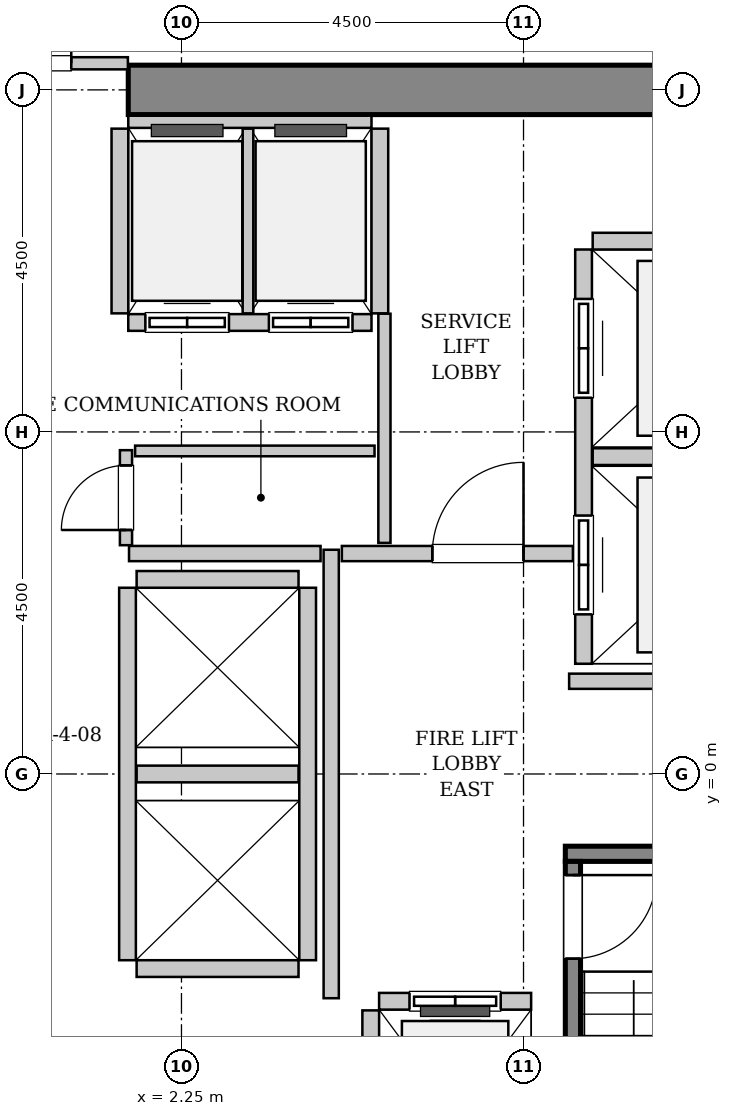
"""IFC4 building model, lengths in metres.
Left out: names, types, materials, properties, quantities, classifications, styles, units other than length and angle.
Written with IfcOpenShell. Run it as: python <this file> out.ifc"""

import sys

from ifc_helpers import new_model, si_unit, direction, frame, frame_2d, origin, place, context, subcontext, project, spatial, rectangle, extrude, source, transform, mapped, element, fill, save


model = new_model("IFC4")
c1 = context("Model", 3, precision=1e-05, world=origin(), true_north=direction((0.0, 1.0)))
c2 = subcontext(c1, "Body", "Model", "MODEL_VIEW")
j1 = project(units=[si_unit("LENGTHUNIT", "METRE"), si_unit("PLANEANGLEUNIT", "RADIAN")], contexts=[c1])
p1 = place(None, origin())
s1 = spatial("IfcSite", under=j1, at=p1, CompositionType="ELEMENT")
p2 = place(p1, origin())
s2 = spatial("IfcBuilding", under=s1, at=p2, CompositionType="ELEMENT")
p3 = place(p2, frame((0.0, 0.0, 86.2)))
s3 = spatial("IfcBuildingStorey", under=s2, at=p3, CompositionType="ELEMENT", Elevation=86.2)
m1 = source(origin(), c2, "Body", "SweptSolid", [
    extrude(rectangle(XDim=10.025, YDim=0.65, at=frame_2d((5.012, 0.0))), origin(), (0.0, 0.0, 1.0), 4.6),
])
p4 = place(p3, frame((1.55, 9.0, 0.0), z_axis=(0.0, 0.0, 1.0), x_axis=(1.0, 0.0, 0.0)))
e1 = element("IfcWall", 1, at=p4, inside=s3, PredefinedType="SHEAR", context=c2, shape_type="MappedRepresentation", body=[
    mapped(m1, transform((0.0, 0.0, 0.0), x_axis=(1.0, 0.0, 0.0), y_axis=(0.0, 1.0, 0.0), z_axis=(0.0, 0.0, 1.0), scale=1.0)),
])
m2 = source(origin(), c2, "Body", "SweptSolid", [
    extrude(rectangle(XDim=3.4, YDim=0.2, at=frame_2d((1.7, 0.0))), origin(), (0.0, 0.0, 1.0), 4.6),
])
p5 = place(p3, frame((7.3, -1.05, 0.0), z_axis=(0.0, 0.0, 1.0), x_axis=(1.0, 0.0, 0.0)))
e2 = element("IfcWall", 2, at=p5, inside=s3, PredefinedType="SOLIDWALL", context=c2, shape_type="MappedRepresentation", body=[
    mapped(m2, transform((0.0, 0.0, 0.0), x_axis=(1.0, 0.0, 0.0), y_axis=(0.0, 1.0, 0.0), z_axis=(0.0, 0.0, 1.0), scale=1.0)),
])
m3 = source(origin(), c2, "Body", "SweptSolid", [
    extrude(rectangle(XDim=7.1, YDim=0.2, at=frame_2d((3.55, 0.0))), origin(), (0.0, 0.0, 1.0), 4.6),
])
p6 = place(p3, frame((7.4, -1.15, 0.0), z_axis=(0.0, 0.0, 1.0), x_axis=(0.0, -1.0, 0.0)))
e3 = element("IfcWall", 3, at=p6, inside=s3, PredefinedType="SOLIDWALL", context=c2, shape_type="MappedRepresentation", body=[
    mapped(m3, transform((0.0, 0.0, 0.0), x_axis=(1.0, 0.0, 0.0), y_axis=(0.0, 1.0, 0.0), z_axis=(0.0, 0.0, 1.0), scale=1.0)),
])
p7 = place(p6, frame((0.18, 0.0, 0.0)))
e4 = element("IfcOpeningElement", 4, at=p7, cuts=e3, PredefinedType="OPENING", context=c2, shape_type="SweptSolid", body=[
    extrude(rectangle(XDim=1.1, YDim=2.15, at=frame_2d((0.55, 1.075))), frame((0.0, 0.11, 0.0), z_axis=(0.0, -1.0, 0.0), x_axis=(1.0, 0.0, 0.0)), (0.0, 0.0, 1.0), 0.22),
])
m4 = source(origin(), c2, "Body", "SweptSolid", [
    extrude(rectangle(XDim=2.0, YDim=0.22, at=frame_2d((1.0, 0.0))), origin(), (0.0, 0.0, 1.0), 4.335),
])
p8 = place(p3, frame((6.85, -2.99, 0.0), z_axis=(0.0, 0.0, 1.0), x_axis=(-1.0, 0.0, 0.0)))
e5 = element("IfcWall", 5, at=p8, inside=s3, PredefinedType="SOLIDWALL", context=c2, shape_type="MappedRepresentation", body=[
    mapped(m4, transform((0.0, 0.0, 0.0), x_axis=(1.0, 0.0, 0.0), y_axis=(0.0, 1.0, 0.0), z_axis=(0.0, 0.0, 1.0), scale=1.0)),
])
p9 = place(p8, frame((0.4, 0.0, 0.0)))
e6 = element("IfcOpeningElement", 6, at=p9, cuts=e5, PredefinedType="OPENING", context=c2, shape_type="SweptSolid", body=[
    extrude(rectangle(XDim=1.2, YDim=2.2, at=frame_2d((0.6, 1.1))), frame((0.0, 0.12, 0.0), z_axis=(0.0, -1.0, 0.0), x_axis=(1.0, 0.0, 0.0)), (0.0, 0.0, 1.0), 0.24),
])
m5 = source(origin(), c2, "Body", "SweptSolid", [
    extrude(rectangle(XDim=2.68, YDim=0.22, at=frame_2d((1.34, 0.0))), origin(), (0.0, 0.0, 1.0), 4.335),
])
p10 = place(p3, frame((4.74, -3.11, 0.0), z_axis=(0.0, 0.0, 1.0), x_axis=(0.0, -1.0, 0.0)))
e7 = element("IfcWall", 7, at=p10, inside=s3, PredefinedType="SOLIDWALL", context=c2, shape_type="MappedRepresentation", body=[
    mapped(m5, transform((0.0, 0.0, 0.0), x_axis=(1.0, 0.0, 0.0), y_axis=(0.0, 1.0, 0.0), z_axis=(0.0, 0.0, 1.0), scale=1.0)),
])
m6 = source(origin(), c2, "Body", "SweptSolid", [
    extrude(rectangle(XDim=5.45, YDim=0.22, at=frame_2d((2.725, 0.0))), origin(), (0.0, 0.0, 1.0), 4.335),
])
p11 = place(p3, frame((7.54, 6.9, 0.0), z_axis=(0.0, 0.0, 1.0), x_axis=(0.0, -1.0, 0.0)))
e8 = element("IfcWall", 8, at=p11, inside=s3, PredefinedType="SOLIDWALL", context=c2, shape_type="MappedRepresentation", body=[
    mapped(m6, transform((0.0, 0.0, 0.0), x_axis=(1.0, 0.0, 0.0), y_axis=(0.0, 1.0, 0.0), z_axis=(0.0, 0.0, 1.0), scale=1.0)),
])
p12 = place(p11, frame((3.5, 0.0, 0.0)))
e9 = element("IfcOpeningElement", 9, at=p12, cuts=e8, PredefinedType="OPENING", context=c2, shape_type="SweptSolid", body=[
    extrude(rectangle(XDim=1.3, YDim=2.3, at=frame_2d((0.65, 1.15))), frame((0.0, 0.12, 0.0), z_axis=(0.0, -1.0, 0.0), x_axis=(1.0, 0.0, 0.0)), (0.0, 0.0, 1.0), 0.24),
])
p13 = place(p11, frame((0.65, 0.0, 0.0)))
e10 = element("IfcOpeningElement", 10, at=p13, cuts=e8, PredefinedType="OPENING", context=c2, shape_type="SweptSolid", body=[
    extrude(rectangle(XDim=1.3, YDim=2.3, at=frame_2d((0.65, 1.15))), frame((0.0, 0.12, 0.0), z_axis=(0.0, -1.0, 0.0), x_axis=(1.0, 0.0, 0.0)), (0.0, 0.0, 1.0), 0.24),
])
m7 = source(origin(), c2, "Body", "SweptSolid", [
    extrude(rectangle(XDim=2.78, YDim=0.22, at=frame_2d((1.39, 0.0))), origin(), (0.0, 0.0, 1.0), 4.335),
])
for number, where, z_axis, x_axis in (
    (11, (7.66, 4.175, 0.0), (0.0, 0.0, 1.0), (1.0, 0.0, 0.0)),
    (12, (10.44, 7.01, 0.0), (0.0, 0.0, 1.0), (-1.0, 0.0, 0.0)),
):
    element("IfcWall", number, at=place(p3, frame(where, z_axis=z_axis, x_axis=x_axis)), inside=s3, PredefinedType="SOLIDWALL", context=c2, shape_type="MappedRepresentation", body=[
        mapped(m7, transform((0.0, 0.0, 0.0), x_axis=(1.0, 0.0, 0.0), y_axis=(0.0, 1.0, 0.0), z_axis=(0.0, 0.0, 1.0), scale=1.0)),
    ])
m8 = source(origin(), c2, "Body", "SweptSolid", [
    extrude(rectangle(XDim=3.2, YDim=0.22, at=frame_2d((1.6, 0.0))), origin(), (0.0, 0.0, 1.0), 4.335),
])
p14 = place(p3, frame((1.55, 5.94, 0.0), z_axis=(0.0, 0.0, 1.0), x_axis=(1.0, 0.0, 0.0)))
e13 = element("IfcWall", 13, at=p14, inside=s3, PredefinedType="SOLIDWALL", context=c2, shape_type="MappedRepresentation", body=[
    mapped(m8, transform((0.0, 0.0, 0.0), x_axis=(1.0, 0.0, 0.0), y_axis=(0.0, 1.0, 0.0), z_axis=(0.0, 0.0, 1.0), scale=1.0)),
])
p15 = place(p14, frame((0.225, 0.0, 0.0)))
e14 = element("IfcOpeningElement", 14, at=p15, cuts=e13, PredefinedType="OPENING", context=c2, shape_type="SweptSolid", body=[
    extrude(rectangle(XDim=1.1, YDim=2.2, at=frame_2d((0.55, 1.1))), frame((0.0, 0.12, 0.0), z_axis=(0.0, -1.0, 0.0), x_axis=(1.0, 0.0, 0.0)), (0.0, 0.0, 1.0), 0.24),
])
p16 = place(p14, frame((1.85, 0.0, 0.0)))
e15 = element("IfcOpeningElement", 15, at=p16, cuts=e13, PredefinedType="OPENING", context=c2, shape_type="SweptSolid", body=[
    extrude(rectangle(XDim=1.1, YDim=2.2, at=frame_2d((0.55, 1.1))), frame((0.0, 0.12, 0.0), z_axis=(0.0, -1.0, 0.0), x_axis=(1.0, 0.0, 0.0)), (0.0, 0.0, 1.0), 0.24),
])
m9 = source(origin(), c2, "Body", "SweptSolid", [
    extrude(rectangle(XDim=3.2, YDim=0.16, at=frame_2d((1.6, 0.0))), origin(), (0.0, 0.0, 1.0), 3.225),
])
p17 = place(p3, frame((4.75, 8.58, 0.0), z_axis=(0.0, 0.0, 1.0), x_axis=(-1.0, 0.0, 0.0)))
e16 = element("IfcWall", 16, at=p17, inside=s3, PredefinedType="PARTITIONING", context=c2, shape_type="MappedRepresentation", body=[
    mapped(m9, transform((0.0, 0.0, 0.0), x_axis=(1.0, 0.0, 0.0), y_axis=(0.0, 1.0, 0.0), z_axis=(0.0, 0.0, 1.0), scale=1.0)),
])
m10 = source(origin(), c2, "Body", "SweptSolid", [
    extrude(rectangle(XDim=2.43, YDim=0.22, at=frame_2d((1.215, 0.0))), origin(), (0.0, 0.0, 1.0), 4.335),
])
p18 = place(p3, frame((1.44, 8.49, 0.0), z_axis=(0.0, 0.0, 1.0), x_axis=(0.0, -1.0, 0.0)))
e17 = element("IfcWall", 17, at=p18, inside=s3, PredefinedType="SOLIDWALL", context=c2, shape_type="MappedRepresentation", body=[
    mapped(m10, transform((0.0, 0.0, 0.0), x_axis=(1.0, 0.0, 0.0), y_axis=(0.0, 1.0, 0.0), z_axis=(0.0, 0.0, 1.0), scale=1.0)),
])
m11 = source(origin(), c2, "Body", "SweptSolid", [
    extrude(rectangle(XDim=2.43, YDim=0.14, at=frame_2d((1.215, 0.0))), origin(), (0.0, 0.0, 1.0), 4.335),
])
p19 = place(p3, frame((3.125, 6.06, 0.0), z_axis=(0.0, 0.0, 1.0), x_axis=(0.0, 1.0, 0.0)))
e18 = element("IfcWall", 18, at=p19, inside=s3, PredefinedType="PARTITIONING", context=c2, shape_type="MappedRepresentation", body=[
    mapped(m11, transform((0.0, 0.0, 0.0), x_axis=(1.0, 0.0, 0.0), y_axis=(0.0, 1.0, 0.0), z_axis=(0.0, 0.0, 1.0), scale=1.0)),
])
p20 = place(p3, frame((4.86, 6.06, 0.0), z_axis=(0.0, 0.0, 1.0), x_axis=(0.0, 1.0, 0.0)))
e19 = element("IfcWall", 19, at=p20, inside=s3, PredefinedType="SOLIDWALL", context=c2, shape_type="MappedRepresentation", body=[
    mapped(m10, transform((0.0, 0.0, 0.0), x_axis=(1.0, 0.0, 0.0), y_axis=(0.0, 1.0, 0.0), z_axis=(0.0, 0.0, 1.0), scale=1.0)),
])
m12 = source(origin(), c2, "Body", "SweptSolid", [
    extrude(rectangle(XDim=4.9, YDim=0.22, at=frame_2d((2.45, 0.0))), origin(), (0.0, 0.0, 1.0), 4.335),
])
for number, where, z_axis, x_axis in (
    (20, (1.54, 2.45, 0.0), (0.0, 0.0, 1.0), (0.0, -1.0, 0.0)),
    (21, (3.91, -2.45, 0.0), (0.0, 0.0, 1.0), (0.0, 1.0, 0.0)),
):
    element("IfcWall", number, at=place(p3, frame(where, z_axis=z_axis, x_axis=x_axis)), inside=s3, PredefinedType="SOLIDWALL", context=c2, shape_type="MappedRepresentation", body=[
        mapped(m12, transform((0.0, 0.0, 0.0), x_axis=(1.0, 0.0, 0.0), y_axis=(0.0, 1.0, 0.0), z_axis=(0.0, 0.0, 1.0), scale=1.0)),
    ])
m13 = source(origin(), c2, "Body", "SweptSolid", [
    extrude(rectangle(XDim=2.13, YDim=0.22, at=frame_2d((1.065, 0.0))), origin(), (0.0, 0.0, 1.0), 4.335),
])
for number, where, z_axis, x_axis in (
    (22, (1.66, -2.56, 0.0), (0.0, 0.0, 1.0), (1.0, 0.0, 0.0)),
    (23, (1.66, 0.0, 0.0), (0.0, 0.0, 1.0), (1.0, 0.0, 0.0)),
    (24, (3.79, 2.56, 0.0), (0.0, 0.0, 1.0), (-1.0, 0.0, 0.0)),
):
    element("IfcWall", number, at=place(p3, frame(where, z_axis=z_axis, x_axis=x_axis)), inside=s3, PredefinedType="SOLIDWALL", context=c2, shape_type="MappedRepresentation", body=[
        mapped(m13, transform((0.0, 0.0, 0.0), x_axis=(1.0, 0.0, 0.0), y_axis=(0.0, 1.0, 0.0), z_axis=(0.0, 0.0, 1.0), scale=1.0)),
    ])
m14 = source(origin(), c2, "Body", "SweptSolid", [
    extrude(rectangle(XDim=5.9, YDim=0.2, at=frame_2d((2.95, 0.0))), origin(), (0.0, 0.0, 1.0), 4.335),
])
p21 = place(p3, frame((4.22, -2.95, 0.0), z_axis=(0.0, 0.0, 1.0), x_axis=(0.0, 1.0, 0.0)))
e25 = element("IfcWall", 25, at=p21, inside=s3, PredefinedType="PARTITIONING", context=c2, shape_type="MappedRepresentation", body=[
    mapped(m14, transform((0.0, 0.0, 0.0), x_axis=(1.0, 0.0, 0.0), y_axis=(0.0, 1.0, 0.0), z_axis=(0.0, 0.0, 1.0), scale=1.0)),
])
m15 = source(origin(), c2, "Body", "SweptSolid", [
    extrude(rectangle(XDim=2.52, YDim=0.2, at=frame_2d((1.26, 0.0))), origin(), (0.0, 0.0, 1.0), 4.335),
])
p22 = place(p3, frame((1.56, 2.9, 0.0), z_axis=(0.0, 0.0, 1.0), x_axis=(1.0, 0.0, 0.0)))
e26 = element("IfcWall", 26, at=p22, inside=s3, PredefinedType="PARTITIONING", context=c2, shape_type="MappedRepresentation", body=[
    mapped(m15, transform((0.0, 0.0, 0.0), x_axis=(1.0, 0.0, 0.0), y_axis=(0.0, 1.0, 0.0), z_axis=(0.0, 0.0, 1.0), scale=1.0)),
])
m16 = source(origin(), c2, "Body", "SweptSolid", [
    extrude(rectangle(XDim=3.04, YDim=0.2, at=frame_2d((1.52, 0.0))), origin(), (0.0, 0.0, 1.0), 4.335),
])
p23 = place(p3, frame((4.36, 2.9, 0.0), z_axis=(0.0, 0.0, 1.0), x_axis=(1.0, 0.0, 0.0)))
e27 = element("IfcWall", 27, at=p23, inside=s3, PredefinedType="PARTITIONING", context=c2, shape_type="MappedRepresentation", body=[
    mapped(m16, transform((0.0, 0.0, 0.0), x_axis=(1.0, 0.0, 0.0), y_axis=(0.0, 1.0, 0.0), z_axis=(0.0, 0.0, 1.0), scale=1.0)),
])
p24 = place(p23, frame((1.19, 0.0, 0.0)))
e28 = element("IfcOpeningElement", 28, at=p24, cuts=e27, PredefinedType="OPENING", context=c2, shape_type="SweptSolid", body=[
    extrude(rectangle(XDim=1.2, YDim=2.15, at=frame_2d((0.6, 1.075))), frame((0.0, 0.11, 0.0), z_axis=(0.0, -1.0, 0.0), x_axis=(1.0, 0.0, 0.0)), (0.0, 0.0, 1.0), 0.22),
])
m17 = source(origin(), c2, "Body", "SweptSolid", [
    extrude(rectangle(XDim=4.11, YDim=0.2, at=frame_2d((2.055, 0.0))), origin(), (0.0, 0.0, 1.0), 4.335),
])
p25 = place(p3, frame((7.35, 1.22, 0.0), z_axis=(0.0, 0.0, 1.0), x_axis=(1.0, 0.0, 0.0)))
e29 = element("IfcWall", 29, at=p25, inside=s3, PredefinedType="PARTITIONING", context=c2, shape_type="MappedRepresentation", body=[
    mapped(m17, transform((0.0, 0.0, 0.0), x_axis=(1.0, 0.0, 0.0), y_axis=(0.0, 1.0, 0.0), z_axis=(0.0, 0.0, 1.0), scale=1.0)),
])
m18 = source(origin(), c2, "Body", "SweptSolid", [
    extrude(rectangle(XDim=3.09, YDim=0.16, at=frame_2d((1.545, 0.0))), origin(), (0.0, 0.0, 1.0), 3.225),
])
p26 = place(p3, frame((-1.545, 9.35, 0.0), z_axis=(0.0, 0.0, 1.0), x_axis=(1.0, 0.0, 0.0)))
e30 = element("IfcWall", 30, at=p26, inside=s3, PredefinedType="PARTITIONING", context=c2, shape_type="MappedRepresentation", body=[
    mapped(m18, transform((0.0, 0.0, 0.0), x_axis=(1.0, 0.0, 0.0), y_axis=(0.0, 1.0, 0.0), z_axis=(0.0, 0.0, 1.0), scale=1.0)),
])
p27 = place(p26, frame((0.745, 0.0, 0.0)))
e31 = element("IfcOpeningElement", 31, at=p27, cuts=e30, PredefinedType="OPENING", context=c2, shape_type="SweptSolid", body=[
    extrude(rectangle(XDim=1.6, YDim=2.3, at=frame_2d((0.8, 1.15))), frame((0.0, 0.09, 0.0), z_axis=(0.0, -1.0, 0.0), x_axis=(1.0, 0.0, 0.0)), (0.0, 0.0, 1.0), 0.18),
])
m19 = source(origin(), c2, "Body", "SweptSolid", [
    extrude(rectangle(XDim=3.015, YDim=0.16, at=frame_2d((1.507, 0.0))), origin(), (0.0, 0.0, 1.0), 4.335),
])
p28 = place(p3, frame((4.92, 3.04, 0.0), z_axis=(0.0, 0.0, 1.0), x_axis=(0.0, 1.0, 0.0)))
e32 = element("IfcWall", 32, at=p28, inside=s3, PredefinedType="PARTITIONING", context=c2, shape_type="MappedRepresentation", body=[
    mapped(m19, transform((0.0, 0.0, 0.0), x_axis=(1.0, 0.0, 0.0), y_axis=(0.0, 1.0, 0.0), z_axis=(0.0, 0.0, 1.0), scale=1.0)),
])
m20 = source(origin(), c2, "Body", "SweptSolid", [
    extrude(rectangle(XDim=1.25, YDim=0.16, at=frame_2d((0.625, 0.0))), origin(), (0.0, 0.0, 1.0), 4.335),
])
p29 = place(p3, frame((1.52, 3.01, 0.0), z_axis=(0.0, 0.0, 1.0), x_axis=(0.0, 1.0, 0.0)))
e33 = element("IfcWall", 33, at=p29, inside=s3, PredefinedType="PARTITIONING", context=c2, shape_type="MappedRepresentation", body=[
    mapped(m20, transform((0.0, 0.0, 0.0), x_axis=(1.0, 0.0, 0.0), y_axis=(0.0, 1.0, 0.0), z_axis=(0.0, 0.0, 1.0), scale=1.0)),
])
p30 = place(p29, frame((0.2, 0.0, 0.0)))
e34 = element("IfcOpeningElement", 34, at=p30, cuts=e33, PredefinedType="OPENING", context=c2, shape_type="SweptSolid", body=[
    extrude(rectangle(XDim=0.85, YDim=2.1, at=frame_2d((0.425, 1.05))), frame((0.0, 0.09, 0.0), z_axis=(0.0, -1.0, 0.0), x_axis=(1.0, 0.0, 0.0)), (0.0, 0.0, 1.0), 0.18),
])
m21 = source(origin(), c2, "Body", "SweptSolid", [
    extrude(rectangle(XDim=3.15, YDim=0.14, at=frame_2d((1.575, 0.0))), origin(), (0.0, 0.0, 1.0), 4.335),
])
p31 = place(p3, frame((1.64, 4.25, 0.0), z_axis=(0.0, 0.0, 1.0), x_axis=(1.0, 0.0, 0.0)))
e35 = element("IfcWall", 35, at=p31, inside=s3, PredefinedType="PARTITIONING", context=c2, shape_type="MappedRepresentation", body=[
    mapped(m21, transform((0.0, 0.0, 0.0), x_axis=(1.0, 0.0, 0.0), y_axis=(0.0, 1.0, 0.0), z_axis=(0.0, 0.0, 1.0), scale=1.0)),
])
m22 = source(origin(), c2, "Body", "SweptSolid", [
    extrude(rectangle(XDim=1.1, YDim=2.15, at=frame_2d((0.55, 1.075))), frame((0.0, 0.025, 0.0), z_axis=(0.0, -1.0, 0.0), x_axis=(1.0, 0.0, 0.0)), (0.0, 0.0, 1.0), 0.05),
])
p32 = place(p7, origin())
e36 = element("IfcDoor", 36, at=p32, inside=s3, OperationType="SINGLE_SWING_LEFT", PredefinedType="DOOR", context=c2, shape_type="MappedRepresentation", body=[
    mapped(m22, transform((0.0, 0.0, 0.0), x_axis=(1.0, 0.0, 0.0), y_axis=(0.0, 1.0, 0.0), z_axis=(0.0, 0.0, 1.0), scale=1.0)),
])
fill(e4, e36)
m23 = source(origin(), c2, "Body", "SweptSolid", [
    extrude(rectangle(XDim=1.2, YDim=2.2, at=frame_2d((0.6, 1.1))), frame((0.0, 0.025, 0.0), z_axis=(0.0, -1.0, 0.0), x_axis=(1.0, 0.0, 0.0)), (0.0, 0.0, 1.0), 0.05),
])
p33 = place(p9, origin())
e37 = element("IfcDoor", 37, at=p33, inside=s3, OperationType="SLIDING_TO_LEFT", PredefinedType="DOOR", context=c2, shape_type="MappedRepresentation", body=[
    mapped(m23, transform((0.0, 0.0, 0.0), x_axis=(1.0, 0.0, 0.0), y_axis=(0.0, 1.0, 0.0), z_axis=(0.0, 0.0, 1.0), scale=1.0)),
])
fill(e6, e37)
m24 = source(origin(), c2, "Body", "SweptSolid", [
    extrude(rectangle(XDim=1.3, YDim=2.3, at=frame_2d((0.65, 1.15))), frame((0.0, 0.025, 0.0), z_axis=(0.0, -1.0, 0.0), x_axis=(1.0, 0.0, 0.0)), (0.0, 0.0, 1.0), 0.05),
])
p34 = place(p12, origin())
e38 = element("IfcDoor", 38, at=p34, inside=s3, OperationType="SLIDING_TO_RIGHT", PredefinedType="DOOR", context=c2, shape_type="MappedRepresentation", body=[
    mapped(m24, transform((0.0, 0.0, 0.0), x_axis=(1.0, 0.0, 0.0), y_axis=(0.0, 1.0, 0.0), z_axis=(0.0, 0.0, 1.0), scale=1.0)),
])
fill(e9, e38)
p35 = place(p13, origin())
e39 = element("IfcDoor", 39, at=p35, inside=s3, OperationType="SLIDING_TO_RIGHT", PredefinedType="DOOR", context=c2, shape_type="MappedRepresentation", body=[
    mapped(m24, transform((0.0, 0.0, 0.0), x_axis=(1.0, 0.0, 0.0), y_axis=(0.0, 1.0, 0.0), z_axis=(0.0, 0.0, 1.0), scale=1.0)),
])
fill(e10, e39)
m25 = source(origin(), c2, "Body", "SweptSolid", [
    extrude(rectangle(XDim=1.1, YDim=2.2, at=frame_2d((0.55, 1.1))), frame((0.0, 0.025, 0.0), z_axis=(0.0, -1.0, 0.0), x_axis=(1.0, 0.0, 0.0)), (0.0, 0.0, 1.0), 0.05),
])
p36 = place(p15, origin())
e40 = element("IfcDoor", 40, at=p36, inside=s3, OperationType="DOUBLE_DOOR_SLIDING", PredefinedType="DOOR", context=c2, shape_type="MappedRepresentation", body=[
    mapped(m25, transform((0.0, 0.0, 0.0), x_axis=(1.0, 0.0, 0.0), y_axis=(0.0, 1.0, 0.0), z_axis=(0.0, 0.0, 1.0), scale=1.0)),
])
fill(e14, e40)
p37 = place(p16, origin())
e41 = element("IfcDoor", 41, at=p37, inside=s3, OperationType="DOUBLE_DOOR_SLIDING", PredefinedType="DOOR", context=c2, shape_type="MappedRepresentation", body=[
    mapped(m25, transform((0.0, 0.0, 0.0), x_axis=(1.0, 0.0, 0.0), y_axis=(0.0, 1.0, 0.0), z_axis=(0.0, 0.0, 1.0), scale=1.0)),
])
fill(e15, e41)
m26 = source(origin(), c2, "Body", "SweptSolid", [
    extrude(rectangle(XDim=1.2, YDim=2.15, at=frame_2d((0.6, 1.075))), frame((0.0, 0.025, 0.0), z_axis=(0.0, -1.0, 0.0), x_axis=(1.0, 0.0, 0.0)), (0.0, 0.0, 1.0), 0.05),
])
p38 = place(p24, origin())
e42 = element("IfcDoor", 42, at=p38, inside=s3, OperationType="SINGLE_SWING_RIGHT", PredefinedType="DOOR", context=c2, shape_type="MappedRepresentation", body=[
    mapped(m26, transform((0.0, 0.0, 0.0), x_axis=(1.0, 0.0, 0.0), y_axis=(0.0, 1.0, 0.0), z_axis=(0.0, 0.0, 1.0), scale=1.0)),
])
fill(e28, e42)
m27 = source(origin(), c2, "Body", "SweptSolid", [
    extrude(rectangle(XDim=1.6, YDim=2.3, at=frame_2d((0.8, 1.15))), frame((0.0, 0.025, 0.0), z_axis=(0.0, -1.0, 0.0), x_axis=(1.0, 0.0, 0.0)), (0.0, 0.0, 1.0), 0.05),
])
p39 = place(p27, origin())
e43 = element("IfcDoor", 43, at=p39, inside=s3, OperationType="DOUBLE_DOOR_SINGLE_SWING", PredefinedType="DOOR", context=c2, shape_type="MappedRepresentation", body=[
    mapped(m27, transform((0.0, 0.0, 0.0), x_axis=(1.0, 0.0, 0.0), y_axis=(0.0, 1.0, 0.0), z_axis=(0.0, 0.0, 1.0), scale=1.0)),
])
fill(e31, e43)
m28 = source(origin(), c2, "Body", "SweptSolid", [
    extrude(rectangle(XDim=0.85, YDim=2.1, at=frame_2d((0.425, 1.05))), frame((0.0, 0.025, 0.0), z_axis=(0.0, -1.0, 0.0), x_axis=(1.0, 0.0, 0.0)), (0.0, 0.0, 1.0), 0.05),
])
p40 = place(p30, origin())
e44 = element("IfcDoor", 44, at=p40, inside=s3, OperationType="SINGLE_SWING_LEFT", PredefinedType="DOOR", context=c2, shape_type="MappedRepresentation", body=[
    mapped(m28, transform((0.0, 0.0, 0.0), x_axis=(1.0, 0.0, 0.0), y_axis=(0.0, 1.0, 0.0), z_axis=(0.0, 0.0, 1.0), scale=1.0)),
])
fill(e34, e44)
save(model, sys.argv[1])
